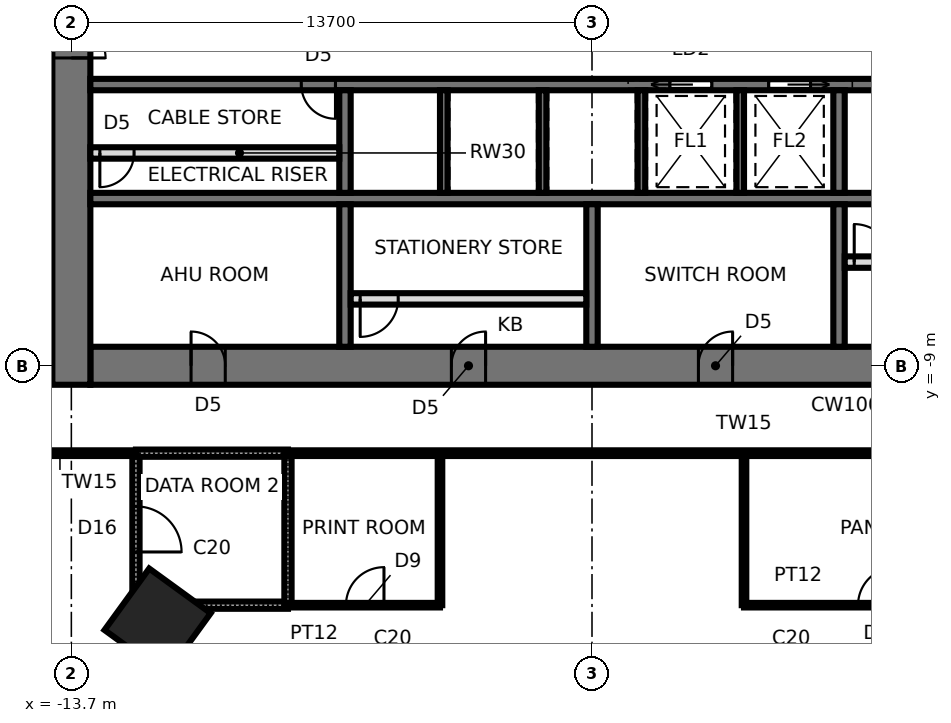
"""IFC4 building model, lengths in metres.
Left out: names, types, materials, properties, quantities, classifications, styles, units other than length and angle.
Written with IfcOpenShell. Run it as: python <this file> out.ifc"""

import sys

from ifc_helpers import new_model, si_unit, direction, frame, frame_2d, origin, origin_2d, place, context, subcontext, project, spatial, rectangle, extrude, element, fill, save


model = new_model("IFC4")
c1 = context("Model", 3, precision=1e-05, world=origin(), true_north=direction((0.0, 1.0)))
c2 = subcontext(c1, "Body", "Model", "MODEL_VIEW")
j1 = project(units=[si_unit("LENGTHUNIT", "METRE"), si_unit("PLANEANGLEUNIT", "RADIAN")], contexts=[c1])
p1 = place(None, origin())
s1 = spatial("IfcSite", under=j1, at=p1, CompositionType="ELEMENT")
p2 = place(p1, origin())
s2 = spatial("IfcBuilding", under=s1, at=p2, CompositionType="ELEMENT")
p3 = place(p2, frame((0.0, 0.0, 32.2)))
s3 = spatial("IfcBuildingStorey", under=s2, at=p3, CompositionType="ELEMENT", Elevation=32.2)
p4 = place(p3, frame((-11.43, -15.733, 0.0), z_axis=(0.0, 0.0, 1.0), x_axis=(-0.587785252292, -0.809016994375, 0.0)))
e1 = element("IfcColumn", 1, at=p4, inside=s3, PredefinedType="COLUMN", context=c2, shape_type="SweptSolid", body=[
    extrude(rectangle(XDim=2.0, YDim=2.0, at=origin_2d()), origin(), (0.0, 0.0, 1.0), 4.2),
])
p5 = place(p3, frame((-13.2, -9.0, 0.0), z_axis=(0.0, 0.0, 1.0), x_axis=(1.0, 0.0, 0.0)))
e2 = element("IfcWall", 2, at=p5, inside=s3, PredefinedType="SHEAR", context=c2, shape_type="SweptSolid", body=[
    extrude(rectangle(XDim=26.4, YDim=1.0, at=frame_2d((13.2, 0.0))), origin(), (0.0, 0.0, 1.0), 4.2),
])
p6 = place(p5, frame((2.65, 0.0, 0.0)))
e3 = element("IfcOpeningElement", 3, at=p6, cuts=e2, PredefinedType="OPENING", context=c2, shape_type="SweptSolid", body=[
    extrude(rectangle(XDim=0.9, YDim=2.1, at=frame_2d((0.45, 1.05))), frame((0.0, 0.51, 0.0), z_axis=(0.0, -1.0, 0.0), x_axis=(1.0, 0.0, 0.0)), (0.0, 0.0, 1.0), 1.02),
])
p7 = place(p5, frame((9.5, 0.0, 0.0)))
e4 = element("IfcOpeningElement", 4, at=p7, cuts=e2, PredefinedType="OPENING", context=c2, shape_type="SweptSolid", body=[
    extrude(rectangle(XDim=0.9, YDim=2.1, at=frame_2d((0.45, 1.05))), frame((0.0, 0.51, 0.0), z_axis=(0.0, -1.0, 0.0), x_axis=(1.0, 0.0, 0.0)), (0.0, 0.0, 1.0), 1.02),
])
p8 = place(p5, frame((16.0, 0.0, 0.0)))
e5 = element("IfcOpeningElement", 5, at=p8, cuts=e2, PredefinedType="OPENING", context=c2, shape_type="SweptSolid", body=[
    extrude(rectangle(XDim=0.9, YDim=2.1, at=frame_2d((0.45, 1.05))), frame((0.0, 0.51, 0.0), z_axis=(0.0, -1.0, 0.0), x_axis=(1.0, 0.0, 0.0)), (0.0, 0.0, 1.0), 1.02),
])
p9 = place(p5, frame((22.85, 0.0, 0.0)))
e6 = element("IfcOpeningElement", 6, at=p9, cuts=e2, PredefinedType="OPENING", context=c2, shape_type="SweptSolid", body=[
    extrude(rectangle(XDim=0.9, YDim=2.1, at=frame_2d((0.45, 1.05))), frame((0.0, 0.51, 0.0), z_axis=(0.0, -1.0, 0.0), x_axis=(1.0, 0.0, 0.0)), (0.0, 0.0, 1.0), 1.02),
])
p10 = place(p3, frame((-13.7, 9.5, 0.0), z_axis=(0.0, 0.0, 1.0), x_axis=(0.0, -1.0, 0.0)))
e7 = element("IfcWall", 7, at=p10, inside=s3, PredefinedType="SHEAR", context=c2, shape_type="SweptSolid", body=[
    extrude(rectangle(XDim=19.0, YDim=1.0, at=frame_2d((9.5, 0.0))), origin(), (0.0, 0.0, 1.0), 4.2),
])
p11 = place(p10, frame((8.6, 0.0, 0.0)))
e8 = element("IfcOpeningElement", 8, at=p11, cuts=e7, PredefinedType="OPENING", context=c2, shape_type="SweptSolid", body=[
    extrude(rectangle(XDim=1.8, YDim=2.4, at=frame_2d((0.9, 1.2))), frame((0.0, 0.51, 0.0), z_axis=(0.0, -1.0, 0.0), x_axis=(1.0, 0.0, 0.0)), (0.0, 0.0, 1.0), 1.02),
])
p12 = place(p3, frame((-13.2, -1.6, 0.0), z_axis=(0.0, 0.0, 1.0), x_axis=(1.0, 0.0, 0.0)))
e9 = element("IfcWall", 9, at=p12, inside=s3, PredefinedType="SHEAR", context=c2, shape_type="SweptSolid", body=[
    extrude(rectangle(XDim=26.4, YDim=0.3, at=frame_2d((13.2, 0.0))), origin(), (0.0, 0.0, 1.0), 4.2),
])
p13 = place(p12, frame((25.15, 0.0, 0.0)))
e10 = element("IfcOpeningElement", 10, at=p13, cuts=e9, PredefinedType="OPENING", context=c2, shape_type="SweptSolid", body=[
    extrude(rectangle(XDim=1.0, YDim=2.1, at=frame_2d((0.5, 1.05))), frame((0.0, 0.16, 0.0), z_axis=(0.0, -1.0, 0.0), x_axis=(1.0, 0.0, 0.0)), (0.0, 0.0, 1.0), 0.32),
])
p14 = place(p12, frame((15.25, 0.0, 0.0)))
e11 = element("IfcOpeningElement", 11, at=p14, cuts=e9, PredefinedType="OPENING", context=c2, shape_type="SweptSolid", body=[
    extrude(rectangle(XDim=1.1, YDim=2.3, at=frame_2d((0.55, 1.15))), frame((0.0, 0.16, 0.0), z_axis=(0.0, -1.0, 0.0), x_axis=(1.0, 0.0, 0.0)), (0.0, 0.0, 1.0), 0.32),
])
p15 = place(p12, frame((17.85, 0.0, 0.0)))
e12 = element("IfcOpeningElement", 12, at=p15, cuts=e9, PredefinedType="OPENING", context=c2, shape_type="SweptSolid", body=[
    extrude(rectangle(XDim=1.1, YDim=2.3, at=frame_2d((0.55, 1.15))), frame((0.0, 0.16, 0.0), z_axis=(0.0, -1.0, 0.0), x_axis=(1.0, 0.0, 0.0)), (0.0, 0.0, 1.0), 0.32),
])
p16 = place(p12, frame((5.55, 0.0, 0.0)))
e13 = element("IfcOpeningElement", 13, at=p16, cuts=e9, PredefinedType="OPENING", context=c2, shape_type="SweptSolid", body=[
    extrude(rectangle(XDim=0.9, YDim=2.1, at=frame_2d((0.45, 1.05))), frame((0.0, 0.16, 0.0), z_axis=(0.0, -1.0, 0.0), x_axis=(1.0, 0.0, 0.0)), (0.0, 0.0, 1.0), 0.32),
])
p17 = place(p3, frame((-13.2, -4.6, 0.0), z_axis=(0.0, 0.0, 1.0), x_axis=(1.0, 0.0, 0.0)))
e14 = element("IfcWall", 14, at=p17, inside=s3, PredefinedType="SHEAR", context=c2, shape_type="SweptSolid", body=[
    extrude(rectangle(XDim=26.4, YDim=0.3, at=frame_2d((13.2, 0.0))), origin(), (0.0, 0.0, 1.0), 4.2),
])
p18 = place(p3, frame((-6.5, -1.75, 0.0), z_axis=(0.0, 0.0, 1.0), x_axis=(0.0, -1.0, 0.0)))
e15 = element("IfcWall", 15, at=p18, inside=s3, PredefinedType="SHEAR", context=c2, shape_type="SweptSolid", body=[
    extrude(rectangle(XDim=2.7, YDim=0.3, at=frame_2d((1.35, 0.0))), origin(), (0.0, 0.0, 1.0), 4.2),
])
p19 = place(p3, frame((-6.5, -4.75, 0.0), z_axis=(0.0, 0.0, 1.0), x_axis=(0.0, -1.0, 0.0)))
e16 = element("IfcWall", 16, at=p19, inside=s3, PredefinedType="SHEAR", context=c2, shape_type="SweptSolid", body=[
    extrude(rectangle(XDim=3.75, YDim=0.3, at=frame_2d((1.875, 0.0))), origin(), (0.0, 0.0, 1.0), 4.2),
])
p20 = place(p3, frame((6.5, -1.75, 0.0), z_axis=(0.0, 0.0, 1.0), x_axis=(0.0, -1.0, 0.0)))
e17 = element("IfcWall", 17, at=p20, inside=s3, PredefinedType="SHEAR", context=c2, shape_type="SweptSolid", body=[
    extrude(rectangle(XDim=2.7, YDim=0.3, at=frame_2d((1.35, 0.0))), origin(), (0.0, 0.0, 1.0), 4.2),
])
p21 = place(p3, frame((6.5, -4.75, 0.0), z_axis=(0.0, 0.0, 1.0), x_axis=(0.0, -1.0, 0.0)))
e18 = element("IfcWall", 18, at=p21, inside=s3, PredefinedType="SHEAR", context=c2, shape_type="SweptSolid", body=[
    extrude(rectangle(XDim=3.75, YDim=0.3, at=frame_2d((1.875, 0.0))), origin(), (0.0, 0.0, 1.0), 4.2),
])
for number, where, z_axis, x_axis in (
    (19, (-3.9, -1.75, 0.0), (0.0, 0.0, 1.0), (0.0, -1.0, 0.0)),
    (20, (-1.3, -1.75, 0.0), (0.0, 0.0, 1.0), (0.0, -1.0, 0.0)),
    (21, (1.3, -1.75, 0.0), (0.0, 0.0, 1.0), (0.0, -1.0, 0.0)),
    (22, (3.9, -1.75, 0.0), (0.0, 0.0, 1.0), (0.0, -1.0, 0.0)),
):
    element("IfcWall", number, at=place(p3, frame(where, z_axis=z_axis, x_axis=x_axis)), inside=s3, PredefinedType="SHEAR", context=c2, shape_type="SweptSolid", body=[
        extrude(rectangle(XDim=2.7, YDim=0.2, at=frame_2d((1.35, 0.0))), origin(), (0.0, 0.0, 1.0), 4.2),
    ])
p22 = place(p3, frame((0.0, -4.75, 0.0), z_axis=(0.0, 0.0, 1.0), x_axis=(0.0, -1.0, 0.0)))
e23 = element("IfcWall", 23, at=p22, inside=s3, PredefinedType="SHEAR", context=c2, shape_type="SweptSolid", body=[
    extrude(rectangle(XDim=3.75, YDim=0.3, at=frame_2d((1.875, 0.0))), origin(), (0.0, 0.0, 1.0), 4.2),
])
p23 = place(p3, frame((-6.35, -7.24, 0.0), z_axis=(0.0, 0.0, 1.0), x_axis=(1.0, 0.0, 0.0)))
e24 = element("IfcWall", 24, at=p23, inside=s3, PredefinedType="PARTITIONING", context=c2, shape_type="SweptSolid", body=[
    extrude(rectangle(XDim=6.2, YDim=0.3, at=frame_2d((3.1, 0.0))), origin(), (0.0, 0.0, 1.0), 4.04),
])
p24 = place(p23, frame((0.25, 0.0, 0.0)))
e25 = element("IfcOpeningElement", 25, at=p24, cuts=e24, PredefinedType="OPENING", context=c2, shape_type="SweptSolid", body=[
    extrude(rectangle(XDim=1.0, YDim=2.4, at=frame_2d((0.5, 1.2))), frame((0.0, 0.16, 0.0), z_axis=(0.0, -1.0, 0.0), x_axis=(1.0, 0.0, 0.0)), (0.0, 0.0, 1.0), 0.32),
])
p25 = place(p3, frame((6.65, -6.272, 0.0), z_axis=(0.0, 0.0, 1.0), x_axis=(1.0, 0.0, 0.0)))
e26 = element("IfcWall", 26, at=p25, inside=s3, PredefinedType="PARTITIONING", context=c2, shape_type="SweptSolid", body=[
    extrude(rectangle(XDim=6.55, YDim=0.3, at=frame_2d((3.275, 0.0))), origin(), (0.0, 0.0, 1.0), 4.04),
])
p26 = place(p25, frame((0.25, 0.0, 0.0)))
e27 = element("IfcOpeningElement", 27, at=p26, cuts=e26, PredefinedType="OPENING", context=c2, shape_type="SweptSolid", body=[
    extrude(rectangle(XDim=1.0, YDim=2.4, at=frame_2d((0.5, 1.2))), frame((0.0, 0.16, 0.0), z_axis=(0.0, -1.0, 0.0), x_axis=(1.0, 0.0, 0.0)), (0.0, 0.0, 1.0), 0.32),
])
p27 = place(p3, frame((-13.2, -3.4, 0.0), z_axis=(0.0, 0.0, 1.0), x_axis=(1.0, 0.0, 0.0)))
e28 = element("IfcWall", 28, at=p27, inside=s3, PredefinedType="SOLIDWALL", context=c2, shape_type="SweptSolid", body=[
    extrude(rectangle(XDim=6.55, YDim=0.3, at=frame_2d((3.275, 0.0))), origin(), (0.0, 0.0, 1.0), 4.04),
])
p28 = place(p27, frame((0.25, 0.0, 0.0)))
e29 = element("IfcOpeningElement", 29, at=p28, cuts=e28, PredefinedType="OPENING", context=c2, shape_type="SweptSolid", body=[
    extrude(rectangle(XDim=0.9, YDim=2.1, at=frame_2d((0.45, 1.05))), frame((0.0, 0.16, 0.0), z_axis=(0.0, -1.0, 0.0), x_axis=(1.0, 0.0, 0.0)), (0.0, 0.0, 1.0), 0.32),
])
p29 = place(p3, frame((-16.0, -11.3, 0.0), z_axis=(0.0, 0.0, 1.0), x_axis=(1.0, 0.0, 0.0)))
e30 = element("IfcWall", 30, at=p29, inside=s3, PredefinedType="PARTITIONING", context=c2, shape_type="SweptSolid", body=[
    extrude(rectangle(XDim=4.0, YDim=0.15, at=frame_2d((2.0, 0.0))), origin(), (0.0, 0.0, 1.0), 4.04),
])
p30 = place(p3, frame((-12.0, -11.3, 0.0), z_axis=(0.0, 0.0, 1.0), x_axis=(0.0, -1.0, 0.0)))
e31 = element("IfcWall", 31, at=p30, inside=s3, PredefinedType="SOLIDWALL", context=c2, shape_type="SweptSolid", body=[
    extrude(rectangle(XDim=4.0, YDim=0.19, at=frame_2d((2.0, 0.0))), origin(), (0.0, 0.0, 1.0), 4.04),
])
p31 = place(p30, frame((1.4, 0.0, 0.0)))
e32 = element("IfcOpeningElement", 32, at=p31, cuts=e31, PredefinedType="OPENING", context=c2, shape_type="SweptSolid", body=[
    extrude(rectangle(XDim=1.2, YDim=2.1, at=frame_2d((0.6, 1.05))), frame((0.0, 0.105, 0.0), z_axis=(0.0, -1.0, 0.0), x_axis=(1.0, 0.0, 0.0)), (0.0, 0.0, 1.0), 0.21),
])
for number, where, z_axis, x_axis in (
    (33, (-8.0, -11.3, 0.0), (0.0, 0.0, 1.0), (-1.0, 0.0, 0.0)),
    (34, (-12.0, -15.3, 0.0), (0.0, 0.0, 1.0), (1.0, 0.0, 0.0)),
    (35, (-8.0, -11.3, 0.0), (0.0, 0.0, 1.0), (0.0, -1.0, 0.0)),
):
    element("IfcWall", number, at=place(p3, frame(where, z_axis=z_axis, x_axis=x_axis)), inside=s3, PredefinedType="SOLIDWALL", context=c2, shape_type="SweptSolid", body=[
        extrude(rectangle(XDim=4.0, YDim=0.19, at=frame_2d((2.0, 0.0))), origin(), (0.0, 0.0, 1.0), 4.04),
    ])
p32 = place(p3, frame((-8.0, -15.3, 0.0), z_axis=(0.0, 0.0, 1.0), x_axis=(1.0, 0.0, 0.0)))
e36 = element("IfcWall", 36, at=p32, inside=s3, PredefinedType="PARTITIONING", context=c2, shape_type="SweptSolid", body=[
    extrude(rectangle(XDim=4.0, YDim=0.12, at=frame_2d((2.0, 0.0))), origin(), (0.0, 0.0, 1.0), 3.586),
])
p33 = place(p32, frame((1.526, 0.0, 0.0)))
e37 = element("IfcOpeningElement", 37, at=p33, cuts=e36, PredefinedType="OPENING", context=c2, shape_type="SweptSolid", body=[
    extrude(rectangle(XDim=1.0, YDim=2.4, at=frame_2d((0.5, 1.2))), frame((0.0, 0.07, 0.0), z_axis=(0.0, -1.0, 0.0), x_axis=(1.0, 0.0, 0.0)), (0.0, 0.0, 1.0), 0.14),
])
for number, where, z_axis, x_axis in (
    (38, (-4.0, -15.3, 0.0), (0.0, 0.0, 1.0), (0.0, 1.0, 0.0)),
    (39, (4.0, -11.3, 0.0), (0.0, 0.0, 1.0), (0.0, -1.0, 0.0)),
):
    element("IfcWall", number, at=place(p3, frame(where, z_axis=z_axis, x_axis=x_axis)), inside=s3, PredefinedType="PARTITIONING", context=c2, shape_type="SweptSolid", body=[
        extrude(rectangle(XDim=4.0, YDim=0.12, at=frame_2d((2.0, 0.0))), origin(), (0.0, 0.0, 1.0), 4.04),
    ])
p34 = place(p3, frame((-8.0, -11.3, 0.0), z_axis=(0.0, 0.0, 1.0), x_axis=(1.0, 0.0, 0.0)))
e40 = element("IfcWall", 40, at=p34, inside=s3, PredefinedType="PARTITIONING", context=c2, shape_type="SweptSolid", body=[
    extrude(rectangle(XDim=24.0, YDim=0.15, at=frame_2d((12.0, 0.0))), origin(), (0.0, 0.0, 1.0), 4.04),
])
p35 = place(p3, frame((4.0, -15.3, 0.0), z_axis=(0.0, 0.0, 1.0), x_axis=(1.0, 0.0, 0.0)))
e41 = element("IfcWall", 41, at=p35, inside=s3, PredefinedType="PARTITIONING", context=c2, shape_type="SweptSolid", body=[
    extrude(rectangle(XDim=7.0, YDim=0.12, at=frame_2d((3.5, 0.0))), origin(), (0.0, 0.0, 1.0), 3.586),
])
p36 = place(p35, frame((3.0, 0.0, 0.0)))
e42 = element("IfcOpeningElement", 42, at=p36, cuts=e41, PredefinedType="OPENING", context=c2, shape_type="SweptSolid", body=[
    extrude(rectangle(XDim=1.0, YDim=2.4, at=frame_2d((0.5, 1.2))), frame((0.0, 0.07, 0.0), z_axis=(0.0, -1.0, 0.0), x_axis=(1.0, 0.0, 0.0)), (0.0, 0.0, 1.0), 0.14),
])
p37 = place(p11, origin())
e43 = element("IfcDoor", 43, at=p37, inside=s3, OperationType="DOUBLE_DOOR_SINGLE_SWING", PredefinedType="DOOR", context=c2, shape_type="SweptSolid", body=[
    extrude(rectangle(XDim=1.72, YDim=2.36, at=frame_2d((0.9, 1.18))), frame((0.0, 0.025, 0.0), z_axis=(0.0, -1.0, 0.0), x_axis=(1.0, 0.0, 0.0)), (0.0, 0.0, 1.0), 0.05),
    extrude(rectangle(XDim=0.04, YDim=2.4, at=frame_2d((0.02, 1.2))), frame((0.0, 0.25, 0.0), z_axis=(0.0, -1.0, 0.0), x_axis=(1.0, 0.0, 0.0)), (0.0, 0.0, 1.0), 0.5),
    extrude(rectangle(XDim=0.04, YDim=2.4, at=frame_2d((1.78, 1.2))), frame((0.0, 0.25, 0.0), z_axis=(0.0, -1.0, 0.0), x_axis=(1.0, 0.0, 0.0)), (0.0, 0.0, 1.0), 0.5),
    extrude(rectangle(XDim=1.72, YDim=0.04, at=frame_2d((0.9, 2.38))), frame((0.0, 0.25, 0.0), z_axis=(0.0, -1.0, 0.0), x_axis=(1.0, 0.0, 0.0)), (0.0, 0.0, 1.0), 0.5),
])
fill(e8, e43)
p38 = place(p14, frame((1.1, 0.0, 0.0), z_axis=(0.0, 0.0, 1.0), x_axis=(-1.0, 0.0, 0.0)))
e44 = element("IfcDoor", 44, at=p38, inside=s3, OperationType="SLIDING_TO_RIGHT", PredefinedType="DOOR", context=c2, shape_type="SweptSolid", body=[
    extrude(rectangle(XDim=1.1, YDim=2.3, at=frame_2d((0.55, 1.15))), frame((0.0, 0.025, 0.0), z_axis=(0.0, -1.0, 0.0), x_axis=(1.0, 0.0, 0.0)), (0.0, 0.0, 1.0), 0.05),
])
fill(e11, e44)
p39 = place(p15, frame((1.1, 0.0, 0.0), z_axis=(0.0, 0.0, 1.0), x_axis=(-1.0, 0.0, 0.0)))
e45 = element("IfcDoor", 45, at=p39, inside=s3, OperationType="SLIDING_TO_LEFT", PredefinedType="DOOR", context=c2, shape_type="SweptSolid", body=[
    extrude(rectangle(XDim=1.1, YDim=2.3, at=frame_2d((0.55, 1.15))), frame((0.0, 0.025, 0.0), z_axis=(0.0, -1.0, 0.0), x_axis=(1.0, 0.0, 0.0)), (0.0, 0.0, 1.0), 0.05),
])
fill(e12, e45)
p40 = place(p16, frame((0.9, 0.0, 0.0), z_axis=(0.0, 0.0, 1.0), x_axis=(-1.0, 0.0, 0.0)))
e46 = element("IfcDoor", 46, at=p40, inside=s3, OperationType="SINGLE_SWING_LEFT", PredefinedType="DOOR", context=c2, shape_type="SweptSolid", body=[
    extrude(rectangle(XDim=0.9, YDim=2.1, at=frame_2d((0.45, 1.05))), frame((0.0, 0.025, 0.0), z_axis=(0.0, -1.0, 0.0), x_axis=(1.0, 0.0, 0.0)), (0.0, 0.0, 1.0), 0.05),
])
fill(e13, e46)
p41 = place(p6, origin())
e47 = element("IfcDoor", 47, at=p41, inside=s3, OperationType="SINGLE_SWING_LEFT", PredefinedType="DOOR", context=c2, shape_type="SweptSolid", body=[
    extrude(rectangle(XDim=0.82, YDim=2.06, at=frame_2d((0.45, 1.03))), frame((0.0, 0.025, 0.0), z_axis=(0.0, -1.0, 0.0), x_axis=(1.0, 0.0, 0.0)), (0.0, 0.0, 1.0), 0.05),
    extrude(rectangle(XDim=0.04, YDim=2.1, at=frame_2d((0.02, 1.05))), frame((0.0, 0.25, 0.0), z_axis=(0.0, -1.0, 0.0), x_axis=(1.0, 0.0, 0.0)), (0.0, 0.0, 1.0), 0.5),
    extrude(rectangle(XDim=0.04, YDim=2.1, at=frame_2d((0.88, 1.05))), frame((0.0, 0.25, 0.0), z_axis=(0.0, -1.0, 0.0), x_axis=(1.0, 0.0, 0.0)), (0.0, 0.0, 1.0), 0.5),
    extrude(rectangle(XDim=0.82, YDim=0.04, at=frame_2d((0.45, 2.08))), frame((0.0, 0.25, 0.0), z_axis=(0.0, -1.0, 0.0), x_axis=(1.0, 0.0, 0.0)), (0.0, 0.0, 1.0), 0.5),
])
fill(e3, e47)
p42 = place(p7, origin())
e48 = element("IfcDoor", 48, at=p42, inside=s3, OperationType="SINGLE_SWING_RIGHT", PredefinedType="DOOR", context=c2, shape_type="SweptSolid", body=[
    extrude(rectangle(XDim=0.82, YDim=2.06, at=frame_2d((0.45, 1.03))), frame((0.0, 0.025, 0.0), z_axis=(0.0, -1.0, 0.0), x_axis=(1.0, 0.0, 0.0)), (0.0, 0.0, 1.0), 0.05),
    extrude(rectangle(XDim=0.04, YDim=2.1, at=frame_2d((0.02, 1.05))), frame((0.0, 0.25, 0.0), z_axis=(0.0, -1.0, 0.0), x_axis=(1.0, 0.0, 0.0)), (0.0, 0.0, 1.0), 0.5),
    extrude(rectangle(XDim=0.04, YDim=2.1, at=frame_2d((0.88, 1.05))), frame((0.0, 0.25, 0.0), z_axis=(0.0, -1.0, 0.0), x_axis=(1.0, 0.0, 0.0)), (0.0, 0.0, 1.0), 0.5),
    extrude(rectangle(XDim=0.82, YDim=0.04, at=frame_2d((0.45, 2.08))), frame((0.0, 0.25, 0.0), z_axis=(0.0, -1.0, 0.0), x_axis=(1.0, 0.0, 0.0)), (0.0, 0.0, 1.0), 0.5),
])
fill(e4, e48)
p43 = place(p8, origin())
e49 = element("IfcDoor", 49, at=p43, inside=s3, OperationType="SINGLE_SWING_RIGHT", PredefinedType="DOOR", context=c2, shape_type="SweptSolid", body=[
    extrude(rectangle(XDim=0.82, YDim=2.06, at=frame_2d((0.45, 1.03))), frame((0.0, 0.025, 0.0), z_axis=(0.0, -1.0, 0.0), x_axis=(1.0, 0.0, 0.0)), (0.0, 0.0, 1.0), 0.05),
    extrude(rectangle(XDim=0.04, YDim=2.1, at=frame_2d((0.02, 1.05))), frame((0.0, 0.25, 0.0), z_axis=(0.0, -1.0, 0.0), x_axis=(1.0, 0.0, 0.0)), (0.0, 0.0, 1.0), 0.5),
    extrude(rectangle(XDim=0.04, YDim=2.1, at=frame_2d((0.88, 1.05))), frame((0.0, 0.25, 0.0), z_axis=(0.0, -1.0, 0.0), x_axis=(1.0, 0.0, 0.0)), (0.0, 0.0, 1.0), 0.5),
    extrude(rectangle(XDim=0.82, YDim=0.04, at=frame_2d((0.45, 2.08))), frame((0.0, 0.25, 0.0), z_axis=(0.0, -1.0, 0.0), x_axis=(1.0, 0.0, 0.0)), (0.0, 0.0, 1.0), 0.5),
])
fill(e5, e49)
p44 = place(p24, frame((1.0, 0.0, 0.0), z_axis=(0.0, 0.0, 1.0), x_axis=(-1.0, 0.0, 0.0)))
e50 = element("IfcDoor", 50, at=p44, inside=s3, OperationType="SINGLE_SWING_RIGHT", PredefinedType="DOOR", context=c2, shape_type="SweptSolid", body=[
    extrude(rectangle(XDim=1.0, YDim=2.4, at=frame_2d((0.5, 1.2))), frame((0.0, 0.025, 0.0), z_axis=(0.0, -1.0, 0.0), x_axis=(1.0, 0.0, 0.0)), (0.0, 0.0, 1.0), 0.05),
])
fill(e25, e50)
p45 = place(p26, origin())
e51 = element("IfcDoor", 51, at=p45, inside=s3, OperationType="SINGLE_SWING_LEFT", PredefinedType="DOOR", context=c2, shape_type="SweptSolid", body=[
    extrude(rectangle(XDim=1.0, YDim=2.4, at=frame_2d((0.5, 1.2))), frame((0.0, 0.025, 0.0), z_axis=(0.0, -1.0, 0.0), x_axis=(1.0, 0.0, 0.0)), (0.0, 0.0, 1.0), 0.05),
])
fill(e27, e51)
p46 = place(p28, frame((0.9, 0.0, 0.0), z_axis=(0.0, 0.0, 1.0), x_axis=(-1.0, 0.0, 0.0)))
e52 = element("IfcDoor", 52, at=p46, inside=s3, OperationType="SINGLE_SWING_RIGHT", PredefinedType="DOOR", context=c2, shape_type="SweptSolid", body=[
    extrude(rectangle(XDim=0.9, YDim=2.1, at=frame_2d((0.45, 1.05))), frame((0.0, 0.025, 0.0), z_axis=(0.0, -1.0, 0.0), x_axis=(1.0, 0.0, 0.0)), (0.0, 0.0, 1.0), 0.05),
])
fill(e29, e52)
p47 = place(p36, origin())
e53 = element("IfcDoor", 53, at=p47, inside=s3, OperationType="SINGLE_SWING_RIGHT", PredefinedType="DOOR", context=c2, shape_type="SweptSolid", body=[
    extrude(rectangle(XDim=1.0, YDim=2.4, at=frame_2d((0.5, 1.2))), frame((0.0, 0.025, 0.0), z_axis=(0.0, -1.0, 0.0), x_axis=(1.0, 0.0, 0.0)), (0.0, 0.0, 1.0), 0.05),
])
fill(e42, e53)
p48 = place(p31, origin())
e54 = element("IfcDoor", 54, at=p48, inside=s3, OperationType="SINGLE_SWING_RIGHT", PredefinedType="DOOR", context=c2, shape_type="SweptSolid", body=[
    extrude(rectangle(XDim=1.2, YDim=2.1, at=frame_2d((0.6, 1.05))), frame((0.0, 0.025, 0.0), z_axis=(0.0, -1.0, 0.0), x_axis=(1.0, 0.0, 0.0)), (0.0, 0.0, 1.0), 0.05),
])
fill(e32, e54)
p49 = place(p33, origin())
e55 = element("IfcDoor", 55, at=p49, inside=s3, OperationType="SINGLE_SWING_RIGHT", PredefinedType="DOOR", context=c2, shape_type="SweptSolid", body=[
    extrude(rectangle(XDim=1.0, YDim=2.4, at=frame_2d((0.5, 1.2))), frame((0.0, 0.025, 0.0), z_axis=(0.0, -1.0, 0.0), x_axis=(1.0, 0.0, 0.0)), (0.0, 0.0, 1.0), 0.05),
])
fill(e37, e55)
save(model, sys.argv[1])
